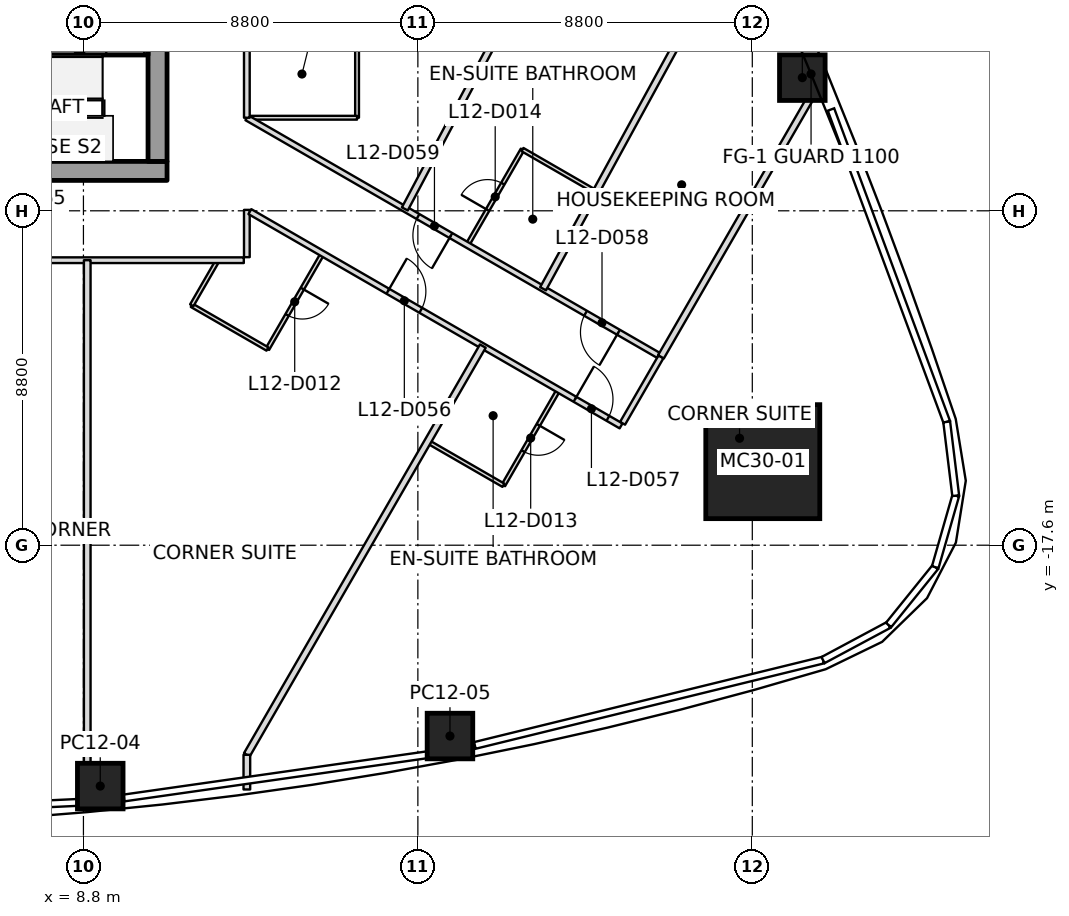
"""IFC4 building model, lengths in metres.
Left out: names, types, materials, properties, quantities, classifications, styles, units other than length and angle.
Written with IfcOpenShell. Run it as: python <this file> out.ifc"""

import sys

from ifc_helpers import new_model, si_unit, direction, frame, frame_2d, origin, origin_2d, place, context, subcontext, project, spatial, rectangle, extrude, clip, halfspace, element, fill, save


model = new_model("IFC4")
c1 = context("Model", 3, precision=1e-05, world=origin(), true_north=direction((0.0, 1.0)))
c2 = subcontext(c1, "Body", "Model", "MODEL_VIEW")
j1 = project(units=[si_unit("LENGTHUNIT", "METRE"), si_unit("PLANEANGLEUNIT", "RADIAN")], contexts=[c1])
p1 = place(None, origin())
s1 = spatial("IfcSite", under=j1, at=p1, CompositionType="ELEMENT")
p2 = place(p1, origin())
s2 = spatial("IfcBuilding", under=s1, at=p2, CompositionType="ELEMENT")
p3 = place(p2, frame((0.0, 0.0, 66.5)))
s3 = spatial("IfcBuildingStorey", under=s2, at=p3, CompositionType="ELEMENT", Elevation=66.5)
p4 = place(p3, frame((26.676, -15.401, 0.0), z_axis=(-0.030531956516, 0.017672925154, 0.999377539946), x_axis=(0.99953379114, 0.000539840661, 0.030527183636)))
e1 = element("IfcColumn", 1, at=p4, inside=s3, PredefinedType="COLUMN", context=c2, shape_type="SweptSolid", body=[
    extrude(rectangle(XDim=3.0, YDim=3.0, at=origin_2d()), origin(), (0.0, 0.0, 1.0), 3.702),
])
p5 = place(p3, frame((9.242, -23.939, 0.0), z_axis=(-0.00942953432, 0.204607977573, 0.978798579584), x_axis=(-0.990215317111, -0.138199898552, 0.019349775144)))
e2 = element("IfcColumn", 2, at=p5, inside=s3, PredefinedType="COLUMN", context=c2, shape_type="SweptSolid", body=[
    clip(clip(extrude(rectangle(XDim=1.2, YDim=1.2, at=origin_2d()), origin(), (0.0, 0.0, 1.0), 3.78), halfspace(frame((0.0, 0.0, 0.007)), True)), halfspace(frame((0.0, 0.0, 3.762)), False)),
])
p6 = place(p3, frame((18.445, -22.622, 0.0), z_axis=(-0.019018956694, 0.15899066195, 0.987096879085), x_axis=(0.981890485807, 0.189097653635, -0.011539119147)))
e3 = element("IfcColumn", 3, at=p6, inside=s3, PredefinedType="COLUMN", context=c2, shape_type="SweptSolid", body=[
    clip(clip(extrude(rectangle(XDim=1.2, YDim=1.2, at=origin_2d()), origin(), (0.0, 0.0, 1.0), 3.748), halfspace(frame((0.0, 0.0, 0.006)), True)), halfspace(frame((0.0, 0.0, 3.734)), False)),
])
p7 = place(p3, frame((27.716, -5.296, 0.0), z_axis=(-0.019460655113, 0.011016709844, 0.999749926235), x_axis=(-0.381436993844, 0.924227098821, -0.017609359201)))
e4 = element("IfcColumn", 4, at=p7, inside=s3, PredefinedType="COLUMN", context=c2, shape_type="SweptSolid", body=[
    extrude(rectangle(XDim=1.2, YDim=1.2, at=origin_2d()), origin(), (0.0, 0.0, 1.0), 3.701),
])
p8 = place(p3, frame((-11.0, -7.75, 0.0), z_axis=(0.0, 0.0, 1.0), x_axis=(1.0, 0.0, 0.0)))
e5 = element("IfcWall", 5, at=p8, inside=s3, PredefinedType="SHEAR", context=c2, shape_type="SweptSolid", body=[
    extrude(rectangle(XDim=22.0, YDim=0.5, at=frame_2d((11.0, 0.0))), origin(), (0.0, 0.0, 1.0), 3.7),
])
p9 = place(p8, frame((10.45, 0.0, 0.0)))
e6 = element("IfcOpeningElement", 6, at=p9, cuts=e5, PredefinedType="OPENING", context=c2, shape_type="SweptSolid", body=[
    extrude(rectangle(XDim=1.1, YDim=2.1, at=frame_2d((0.55, 1.05))), frame((0.0, 0.25, 0.0), z_axis=(0.0, -1.0, 0.0), x_axis=(1.0, 0.0, 0.0)), (0.0, 0.0, 1.0), 0.5),
])
p10 = place(p3, frame((10.75, -7.5, 0.0), z_axis=(0.0, 0.0, 1.0), x_axis=(0.0, 1.0, 0.0)))
e7 = element("IfcWall", 7, at=p10, inside=s3, PredefinedType="SHEAR", context=c2, shape_type="SweptSolid", body=[
    extrude(rectangle(XDim=15.0, YDim=0.5, at=frame_2d((7.5, 0.0))), origin(), (0.0, 0.0, 1.0), 3.7),
])
p11 = place(p10, frame((6.6, 0.0, 0.0)))
e8 = element("IfcOpeningElement", 8, at=p11, cuts=e7, PredefinedType="OPENING", context=c2, shape_type="SweptSolid", body=[
    extrude(rectangle(XDim=1.8, YDim=2.1, at=frame_2d((0.9, 1.05))), frame((0.0, 0.25, 0.0), z_axis=(0.0, -1.0, 0.0), x_axis=(1.0, 0.0, 0.0)), (0.0, 0.0, 1.0), 0.5),
])
p12 = place(p3, frame((6.1, -4.6, 0.0), z_axis=(0.0, 0.0, 1.0), x_axis=(1.0, 0.0, 0.0)))
e9 = element("IfcWall", 9, at=p12, inside=s3, PredefinedType="SOLIDWALL", context=c2, shape_type="SweptSolid", body=[
    extrude(rectangle(XDim=2.6, YDim=0.2, at=frame_2d((1.3, 0.0))), origin(), (0.0, 0.0, 1.0), 3.55),
])
p13 = place(p3, frame((8.7, -4.6, 0.0), z_axis=(0.0, 0.0, 1.0), x_axis=(1.0, 0.0, 0.0)))
e10 = element("IfcWall", 10, at=p13, inside=s3, PredefinedType="SOLIDWALL", context=c2, shape_type="SweptSolid", body=[
    extrude(rectangle(XDim=1.8, YDim=0.2, at=frame_2d((0.9, 0.0))), origin(), (0.0, 0.0, 1.0), 3.55),
])
p14 = place(p13, frame((0.7, 0.0, 0.0)))
e11 = element("IfcOpeningElement", 11, at=p14, cuts=e10, PredefinedType="OPENING", context=c2, shape_type="SweptSolid", body=[
    extrude(rectangle(XDim=1.0, YDim=2.1, at=frame_2d((0.5, 1.05))), frame((0.0, 0.1, 0.0), z_axis=(0.0, -1.0, 0.0), x_axis=(1.0, 0.0, 0.0)), (0.0, 0.0, 1.0), 0.2),
])
p15 = place(p3, frame((8.9, -24.503, 0.0), z_axis=(0.0, 0.0, 1.0), x_axis=(0.0, 1.0, 0.0)))
e12 = element("IfcWall", 12, at=p15, inside=s3, PredefinedType="PARTITIONING", context=c2, shape_type="SweptSolid", body=[
    extrude(rectangle(XDim=14.403, YDim=0.175, at=frame_2d((7.201, 0.0))), origin(), (0.0, 0.0, 1.0), 3.15),
])
p16 = place(p3, frame((19.309, -12.361, 0.0), z_axis=(0.0, 0.0, 1.0), x_axis=(-0.499987367932, -0.86603269679, 0.0)))
e13 = element("IfcWall", 13, at=p16, inside=s3, PredefinedType="PARTITIONING", context=c2, shape_type="SweptSolid", body=[
    extrude(rectangle(XDim=12.418, YDim=0.175, at=frame_2d((6.209, 0.0))), origin(), (0.0, 0.0, 1.0), 2.934),
])
p17 = place(p3, frame((13.1, -23.115, 0.0), z_axis=(0.0, 0.0, 1.0), x_axis=(0.0, -1.0, 0.0)))
e14 = element("IfcWall", 14, at=p17, inside=s3, PredefinedType="PARTITIONING", context=c2, shape_type="SweptSolid", body=[
    extrude(rectangle(XDim=0.912, YDim=0.175, at=frame_2d((0.456, 0.0))), origin(), (0.0, 0.0, 1.0), 3.15),
])
p18 = place(p3, frame((17.257, -8.751, 0.0), z_axis=(0.0, 0.0, 1.0), x_axis=(0.468490827691, 0.883468360707, 0.0)))
e15 = element("IfcWall", 15, at=p18, inside=s3, PredefinedType="PARTITIONING", context=c2, shape_type="SweptSolid", body=[
    extrude(rectangle(XDim=14.188, YDim=0.175, at=frame_2d((7.094, 0.0))), origin(), (0.0, 0.0, 1.0), 2.947),
])
p19 = place(p3, frame((26.192, -1.154, 0.0), z_axis=(0.0, 0.0, 1.0), x_axis=(-0.479475866819, -0.877555065587, 0.0)))
e16 = element("IfcWall", 16, at=p19, inside=s3, PredefinedType="PARTITIONING", context=c2, shape_type="SweptSolid", body=[
    extrude(rectangle(XDim=11.05, YDim=0.175, at=frame_2d((5.525, 0.0))), origin(), (0.0, 0.0, 1.0), 2.934),
])
p20 = place(p3, frame((23.997, -12.642, 0.0), z_axis=(0.0, 0.0, 1.0), x_axis=(0.49999045727, 0.866030913212, 0.0)))
e17 = element("IfcWall", 17, at=p20, inside=s3, PredefinedType="PARTITIONING", context=c2, shape_type="SweptSolid", body=[
    extrude(rectangle(XDim=8.543, YDim=0.175, at=frame_2d((4.271, 0.0))), origin(), (0.0, 0.0, 1.0), 2.934),
])
p21 = place(p3, frame((-13.02, -10.1, 0.0), z_axis=(0.0, 0.0, 1.0), x_axis=(1.0, 0.0, 0.0)))
e18 = element("IfcWall", 18, at=p21, inside=s3, PredefinedType="PARTITIONING", context=c2, shape_type="SweptSolid", body=[
    extrude(rectangle(XDim=26.04, YDim=0.15, at=frame_2d((13.02, 0.0))), origin(), (0.0, 0.0, 1.0), 2.947),
])
p22 = place(p21, frame((4.02, 0.0, 0.0)))
e19 = element("IfcOpeningElement", 19, at=p22, cuts=e18, PredefinedType="OPENING", context=c2, shape_type="SweptSolid", body=[
    extrude(rectangle(XDim=1.0, YDim=2.1, at=frame_2d((0.5, 1.05))), frame((0.0, 0.075, 0.0), z_axis=(0.0, -1.0, 0.0), x_axis=(1.0, 0.0, 0.0)), (0.0, 0.0, 1.0), 0.15),
])
p23 = place(p21, frame((7.02, 0.0, 0.0)))
e20 = element("IfcOpeningElement", 20, at=p23, cuts=e18, PredefinedType="OPENING", context=c2, shape_type="SweptSolid", body=[
    extrude(rectangle(XDim=1.0, YDim=2.1, at=frame_2d((0.5, 1.05))), frame((0.0, 0.075, 0.0), z_axis=(0.0, -1.0, 0.0), x_axis=(1.0, 0.0, 0.0)), (0.0, 0.0, 1.0), 0.15),
])
p24 = place(p21, frame((12.12, 0.0, 0.0)))
e21 = element("IfcOpeningElement", 21, at=p24, cuts=e18, PredefinedType="OPENING", context=c2, shape_type="SweptSolid", body=[
    extrude(rectangle(XDim=1.0, YDim=2.1, at=frame_2d((0.5, 1.05))), frame((0.0, 0.075, 0.0), z_axis=(0.0, -1.0, 0.0), x_axis=(1.0, 0.0, 0.0)), (0.0, 0.0, 1.0), 0.15),
])
p25 = place(p21, frame((16.62, 0.0, 0.0)))
e22 = element("IfcOpeningElement", 22, at=p25, cuts=e18, PredefinedType="OPENING", context=c2, shape_type="SweptSolid", body=[
    extrude(rectangle(XDim=1.0, YDim=2.1, at=frame_2d((0.5, 1.05))), frame((0.0, 0.075, 0.0), z_axis=(0.0, -1.0, 0.0), x_axis=(1.0, 0.0, 0.0)), (0.0, 0.0, 1.0), 0.15),
])
p26 = place(p21, frame((19.62, 0.0, 0.0)))
e23 = element("IfcOpeningElement", 23, at=p26, cuts=e18, PredefinedType="OPENING", context=c2, shape_type="SweptSolid", body=[
    extrude(rectangle(XDim=1.0, YDim=2.1, at=frame_2d((0.5, 1.05))), frame((0.0, 0.075, 0.0), z_axis=(0.0, -1.0, 0.0), x_axis=(1.0, 0.0, 0.0)), (0.0, 0.0, 1.0), 0.15),
])
p27 = place(p3, frame((13.1, -10.02, 0.0), z_axis=(0.0, 0.0, 1.0), x_axis=(0.0, 1.0, 0.0)))
e24 = element("IfcWall", 24, at=p27, inside=s3, PredefinedType="PARTITIONING", context=c2, shape_type="SweptSolid", body=[
    extrude(rectangle(XDim=1.244, YDim=0.15, at=frame_2d((0.622, 0.0))), origin(), (0.0, 0.0, 1.0), 2.797),
])
p28 = place(p3, frame((13.179, -8.822, 0.0), z_axis=(0.0, 0.0, 1.0), x_axis=(0.866025893256, -0.499999152209, 0.0)))
e25 = element("IfcWall", 25, at=p28, inside=s3, PredefinedType="PARTITIONING", context=c2, shape_type="SweptSolid", body=[
    extrude(rectangle(XDim=11.278, YDim=0.15, at=frame_2d((5.639, 0.0))), origin(), (0.0, 0.0, 1.0), 2.797),
])
p29 = place(p28, frame((4.193, 0.0, 0.0)))
e26 = element("IfcOpeningElement", 26, at=p29, cuts=e25, PredefinedType="OPENING", context=c2, shape_type="SweptSolid", body=[
    extrude(rectangle(XDim=1.0, YDim=2.1, at=frame_2d((0.5, 1.05))), frame((0.0, 0.075, 0.0), z_axis=(0.0, -1.0, 0.0), x_axis=(1.0, 0.0, 0.0)), (0.0, 0.0, 1.0), 0.15),
])
p30 = place(p28, frame((9.878, 0.0, 0.0)))
e27 = element("IfcOpeningElement", 27, at=p30, cuts=e25, PredefinedType="OPENING", context=c2, shape_type="SweptSolid", body=[
    extrude(rectangle(XDim=1.0, YDim=2.1, at=frame_2d((0.5, 1.05))), frame((0.0, 0.075, 0.0), z_axis=(0.0, -1.0, 0.0), x_axis=(1.0, 0.0, 0.0)), (0.0, 0.0, 1.0), 0.15),
])
p31 = place(p3, frame((22.987, -14.391, 0.0), z_axis=(0.0, 0.0, 1.0), x_axis=(0.500025864173, 0.866010470582, 0.0)))
e28 = element("IfcWall", 28, at=p31, inside=s3, PredefinedType="PARTITIONING", context=c2, shape_type="SweptSolid", body=[
    extrude(rectangle(XDim=2.02, YDim=0.15, at=frame_2d((1.01, 0.0))), origin(), (0.0, 0.0, 1.0), 2.797),
])
p32 = place(p3, frame((23.927, -12.602, 0.0), z_axis=(0.0, 0.0, 1.0), x_axis=(-0.866019736132, 0.500009816534, 0.0)))
e29 = element("IfcWall", 29, at=p32, inside=s3, PredefinedType="PARTITIONING", context=c2, shape_type="SweptSolid", body=[
    extrude(rectangle(XDim=12.502, YDim=0.15, at=frame_2d((6.251, 0.0))), origin(), (0.0, 0.0, 1.0), 2.947),
])
p33 = place(p32, frame((1.211, 0.0, 0.0)))
e30 = element("IfcOpeningElement", 30, at=p33, cuts=e29, PredefinedType="OPENING", context=c2, shape_type="SweptSolid", body=[
    extrude(rectangle(XDim=1.0, YDim=2.1, at=frame_2d((0.5, 1.05))), frame((0.0, 0.075, 0.0), z_axis=(0.0, -1.0, 0.0), x_axis=(1.0, 0.0, 0.0)), (0.0, 0.0, 1.0), 0.15),
])
p34 = place(p32, frame((6.302, 0.0, 0.0)))
e31 = element("IfcOpeningElement", 31, at=p34, cuts=e29, PredefinedType="OPENING", context=c2, shape_type="SweptSolid", body=[
    extrude(rectangle(XDim=1.0, YDim=2.1, at=frame_2d((0.5, 1.05))), frame((0.0, 0.075, 0.0), z_axis=(0.0, -1.0, 0.0), x_axis=(1.0, 0.0, 0.0)), (0.0, 0.0, 1.0), 0.15),
])
p35 = place(p3, frame((13.1, -6.351, 0.0), z_axis=(0.0, 0.0, 1.0), x_axis=(0.0, 1.0, 0.0)))
e32 = element("IfcWall", 32, at=p35, inside=s3, PredefinedType="PARTITIONING", context=c2, shape_type="SweptSolid", body=[
    extrude(rectangle(XDim=16.371, YDim=0.15, at=frame_2d((8.186, 0.0))), origin(), (0.0, 0.0, 1.0), 3.017),
])
p36 = place(p35, frame((14.751, 0.0, 0.0)))
e33 = element("IfcOpeningElement", 33, at=p36, cuts=e32, PredefinedType="OPENING", context=c2, shape_type="SweptSolid", body=[
    extrude(rectangle(XDim=1.0, YDim=2.1, at=frame_2d((0.5, 1.05))), frame((0.0, 0.075, 0.0), z_axis=(0.0, -1.0, 0.0), x_axis=(1.0, 0.0, 0.0)), (0.0, 0.0, 1.0), 0.15),
])
p37 = place(p35, frame((6.525, 0.0, 0.0)))
e34 = element("IfcOpeningElement", 34, at=p37, cuts=e32, PredefinedType="OPENING", context=c2, shape_type="SweptSolid", body=[
    extrude(rectangle(XDim=1.0, YDim=2.1, at=frame_2d((0.5, 1.05))), frame((0.0, 0.075, 0.0), z_axis=(0.0, -1.0, 0.0), x_axis=(1.0, 0.0, 0.0)), (0.0, 0.0, 1.0), 0.15),
])
p38 = place(p3, frame((15.077, -9.952, 0.0), z_axis=(0.0, 0.0, 1.0), x_axis=(-0.499999802827, -0.866025517622, 0.0)))
e35 = element("IfcWall", 35, at=p38, inside=s3, PredefinedType="PARTITIONING", context=c2, shape_type="SweptSolid", body=[
    extrude(rectangle(XDim=2.87, YDim=0.1, at=frame_2d((1.435, 0.0))), origin(), (0.0, 0.0, 1.0), 2.797),
])
p39 = place(p38, frame((1.035, 0.0, 0.0)))
e36 = element("IfcOpeningElement", 36, at=p39, cuts=e35, PredefinedType="OPENING", context=c2, shape_type="SweptSolid", body=[
    extrude(rectangle(XDim=0.8, YDim=2.1, at=frame_2d((0.4, 1.05))), frame((0.0, 0.05, 0.0), z_axis=(0.0, -1.0, 0.0), x_axis=(1.0, 0.0, 0.0)), (0.0, 0.0, 1.0), 0.1),
])
p40 = place(p3, frame((13.642, -12.437, 0.0), z_axis=(0.0, 0.0, 1.0), x_axis=(-0.866007057882, 0.500031774688, 0.0)))
e37 = element("IfcWall", 37, at=p40, inside=s3, PredefinedType="PARTITIONING", context=c2, shape_type="SweptSolid", body=[
    extrude(rectangle(XDim=2.3, YDim=0.1, at=frame_2d((1.15, 0.0))), origin(), (0.0, 0.0, 1.0), 3.017),
])
p41 = place(p3, frame((11.65, -11.287, 0.0), z_axis=(0.0, 0.0, 1.0), x_axis=(0.500049290317, 0.865996944136, 0.0)))
e38 = element("IfcWall", 38, at=p41, inside=s3, PredefinedType="PARTITIONING", context=c2, shape_type="SweptSolid", body=[
    extrude(rectangle(XDim=1.336, YDim=0.1, at=frame_2d((0.668, 0.0))), origin(), (0.0, 0.0, 1.0), 3.15),
])
p42 = place(p3, frame((16.0, -4.051, 0.0), z_axis=(0.0, 0.0, 1.0), x_axis=(0.0, -1.0, 0.0)))
e39 = element("IfcWall", 39, at=p42, inside=s3, PredefinedType="PARTITIONING", context=c2, shape_type="SweptSolid", body=[
    extrude(rectangle(XDim=2.3, YDim=0.1, at=frame_2d((1.15, 0.0))), origin(), (0.0, 0.0, 1.0), 2.947),
])
p43 = place(p3, frame((16.0, -6.351, 0.0), z_axis=(0.0, 0.0, 1.0), x_axis=(-1.0, 0.0, 0.0)))
e40 = element("IfcWall", 40, at=p43, inside=s3, PredefinedType="PARTITIONING", context=c2, shape_type="SweptSolid", body=[
    extrude(rectangle(XDim=2.84, YDim=0.1, at=frame_2d((1.42, 0.0))), origin(), (0.0, 0.0, 1.0), 2.947),
])
p44 = place(p3, frame((21.286, -13.537, 0.0), z_axis=(0.0, 0.0, 1.0), x_axis=(-0.499999802827, -0.866025517622, 0.0)))
e41 = element("IfcWall", 41, at=p44, inside=s3, PredefinedType="PARTITIONING", context=c2, shape_type="SweptSolid", body=[
    extrude(rectangle(XDim=2.87, YDim=0.1, at=frame_2d((1.435, 0.0))), origin(), (0.0, 0.0, 1.0), 3.15),
])
p45 = place(p44, frame((1.035, 0.0, 0.0)))
e42 = element("IfcOpeningElement", 42, at=p45, cuts=e41, PredefinedType="OPENING", context=c2, shape_type="SweptSolid", body=[
    extrude(rectangle(XDim=0.8, YDim=2.1, at=frame_2d((0.4, 1.05))), frame((0.0, 0.05, 0.0), z_axis=(0.0, -1.0, 0.0), x_axis=(1.0, 0.0, 0.0)), (0.0, 0.0, 1.0), 0.1),
])
p46 = place(p3, frame((19.851, -16.022, 0.0), z_axis=(0.0, 0.0, 1.0), x_axis=(-0.866017224141, 0.500014167291, 0.0)))
e43 = element("IfcWall", 43, at=p46, inside=s3, PredefinedType="PARTITIONING", context=c2, shape_type="SweptSolid", body=[
    extrude(rectangle(XDim=2.27, YDim=0.1, at=frame_2d((1.135, 0.0))), origin(), (0.0, 0.0, 1.0), 3.15),
])
p47 = place(p3, frame((18.917, -9.675, 0.0), z_axis=(0.0, 0.0, 1.0), x_axis=(0.499972835562, 0.866041086612, 0.0)))
e44 = element("IfcWall", 44, at=p47, inside=s3, PredefinedType="PARTITIONING", context=c2, shape_type="SweptSolid", body=[
    extrude(rectangle(XDim=2.87, YDim=0.1, at=frame_2d((1.435, 0.0))), origin(), (0.0, 0.0, 1.0), 3.15),
])
p48 = place(p47, frame((1.035, 0.0, 0.0)))
e45 = element("IfcOpeningElement", 45, at=p48, cuts=e44, PredefinedType="OPENING", context=c2, shape_type="SweptSolid", body=[
    extrude(rectangle(XDim=0.8, YDim=2.1, at=frame_2d((0.4, 1.05))), frame((0.0, 0.05, 0.0), z_axis=(0.0, -1.0, 0.0), x_axis=(1.0, 0.0, 0.0)), (0.0, 0.0, 1.0), 0.1),
])
p49 = place(p3, frame((20.352, -7.189, 0.0), z_axis=(0.0, 0.0, 1.0), x_axis=(0.866017224141, -0.500014167291, 0.0)))
e46 = element("IfcWall", 46, at=p49, inside=s3, PredefinedType="PARTITIONING", context=c2, shape_type="SweptSolid", body=[
    extrude(rectangle(XDim=2.27, YDim=0.1, at=frame_2d((1.135, 0.0))), origin(), (0.0, 0.0, 1.0), 3.15),
])
p50 = place(p29, origin())
e47 = element("IfcDoor", 47, at=p50, inside=s3, OperationType="SINGLE_SWING_LEFT", PredefinedType="DOOR", context=c2, shape_type="SweptSolid", body=[
    extrude(rectangle(XDim=1.0, YDim=2.1, at=frame_2d((0.5, 1.05))), frame((0.0, 0.025, 0.0), z_axis=(0.0, -1.0, 0.0), x_axis=(1.0, 0.0, 0.0)), (0.0, 0.0, 1.0), 0.05),
])
fill(e26, e47)
p51 = place(p39, origin())
e48 = element("IfcDoor", 48, at=p51, inside=s3, OperationType="SINGLE_SWING_LEFT", PredefinedType="DOOR", context=c2, shape_type="SweptSolid", body=[
    extrude(rectangle(XDim=0.8, YDim=2.1, at=frame_2d((0.4, 1.05))), frame((0.0, 0.025, 0.0), z_axis=(0.0, -1.0, 0.0), x_axis=(1.0, 0.0, 0.0)), (0.0, 0.0, 1.0), 0.05),
])
fill(e36, e48)
p52 = place(p30, origin())
e49 = element("IfcDoor", 49, at=p52, inside=s3, OperationType="SINGLE_SWING_LEFT", PredefinedType="DOOR", context=c2, shape_type="SweptSolid", body=[
    extrude(rectangle(XDim=1.0, YDim=2.1, at=frame_2d((0.5, 1.05))), frame((0.0, 0.025, 0.0), z_axis=(0.0, -1.0, 0.0), x_axis=(1.0, 0.0, 0.0)), (0.0, 0.0, 1.0), 0.05),
])
fill(e27, e49)
p53 = place(p45, origin())
e50 = element("IfcDoor", 50, at=p53, inside=s3, OperationType="SINGLE_SWING_RIGHT", PredefinedType="DOOR", context=c2, shape_type="SweptSolid", body=[
    extrude(rectangle(XDim=0.8, YDim=2.1, at=frame_2d((0.4, 1.05))), frame((0.0, 0.025, 0.0), z_axis=(0.0, -1.0, 0.0), x_axis=(1.0, 0.0, 0.0)), (0.0, 0.0, 1.0), 0.05),
])
fill(e42, e50)
p54 = place(p33, origin())
e51 = element("IfcDoor", 51, at=p54, inside=s3, OperationType="SINGLE_SWING_LEFT", PredefinedType="DOOR", context=c2, shape_type="SweptSolid", body=[
    extrude(rectangle(XDim=1.0, YDim=2.1, at=frame_2d((0.5, 1.05))), frame((0.0, 0.025, 0.0), z_axis=(0.0, -1.0, 0.0), x_axis=(1.0, 0.0, 0.0)), (0.0, 0.0, 1.0), 0.05),
])
fill(e30, e51)
p55 = place(p34, origin())
e52 = element("IfcDoor", 52, at=p55, inside=s3, OperationType="SINGLE_SWING_LEFT", PredefinedType="DOOR", context=c2, shape_type="SweptSolid", body=[
    extrude(rectangle(XDim=1.0, YDim=2.1, at=frame_2d((0.5, 1.05))), frame((0.0, 0.025, 0.0), z_axis=(0.0, -1.0, 0.0), x_axis=(1.0, 0.0, 0.0)), (0.0, 0.0, 1.0), 0.05),
])
fill(e31, e52)
p56 = place(p48, origin())
e53 = element("IfcDoor", 53, at=p56, inside=s3, OperationType="SINGLE_SWING_RIGHT", PredefinedType="DOOR", context=c2, shape_type="SweptSolid", body=[
    extrude(rectangle(XDim=0.8, YDim=2.1, at=frame_2d((0.4, 1.05))), frame((0.0, 0.025, 0.0), z_axis=(0.0, -1.0, 0.0), x_axis=(1.0, 0.0, 0.0)), (0.0, 0.0, 1.0), 0.05),
])
fill(e45, e53)
p57 = place(p14, origin())
e54 = element("IfcDoor", 54, at=p57, inside=s3, OperationType="SINGLE_SWING_RIGHT", PredefinedType="DOOR", context=c2, shape_type="SweptSolid", body=[
    extrude(rectangle(XDim=1.0, YDim=2.1, at=frame_2d((0.5, 1.05))), frame((0.0, 0.025, 0.0), z_axis=(0.0, -1.0, 0.0), x_axis=(1.0, 0.0, 0.0)), (0.0, 0.0, 1.0), 0.05),
])
fill(e11, e54)
save(model, sys.argv[1])
